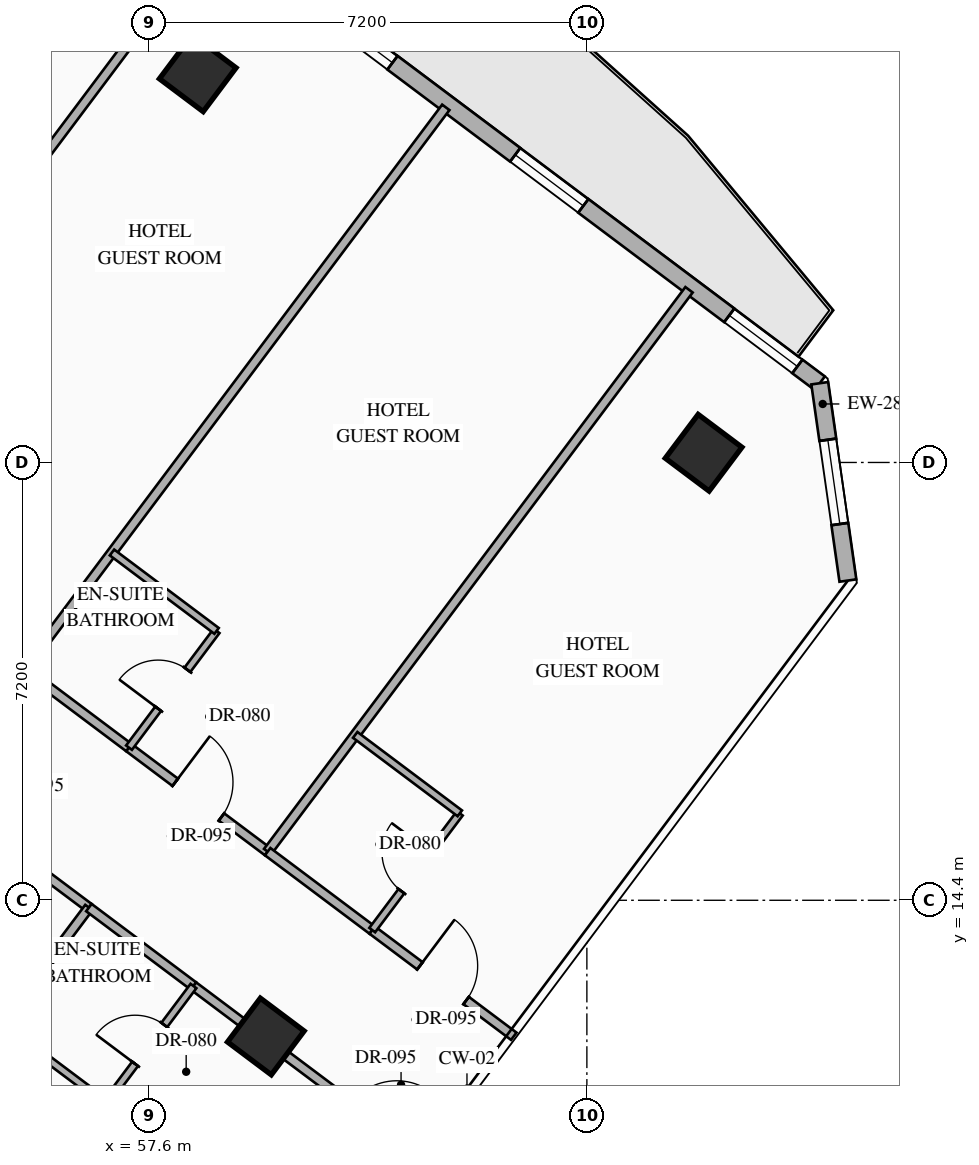
"""IFC4 building model, lengths in metres.
Left out: names, types, materials, properties, quantities, classifications, styles, units other than length and angle.
Written with IfcOpenShell. Run it as: python <this file> out.ifc"""

import sys

from ifc_helpers import new_model, si_unit, direction, frame, frame_2d, origin, origin_2d, place, context, subcontext, project, spatial, rectangle, hollow_rectangle, extrude, element, fill, save


model = new_model("IFC4")
c1 = context("Model", 3, precision=1e-05, world=origin(), true_north=direction((0.0, 1.0)))
c2 = subcontext(c1, "Body", "Model", "MODEL_VIEW")
j1 = project(units=[si_unit("LENGTHUNIT", "METRE"), si_unit("PLANEANGLEUNIT", "RADIAN")], contexts=[c1])
p1 = place(None, origin())
s1 = spatial("IfcSite", under=j1, at=p1, CompositionType="ELEMENT")
p2 = place(p1, origin())
s2 = spatial("IfcBuilding", under=s1, at=p2, CompositionType="ELEMENT")
p3 = place(p2, frame((0.0, 0.0, 74.6)))
s3 = spatial("IfcBuildingStorey", under=s2, at=p3, CompositionType="ELEMENT", Elevation=74.6)
for number, where, z_axis, x_axis in (
    (1, (58.4, 28.0, 0.0), (0.0, 0.0, 1.0), (0.8, -0.6, 0.0)),
    (2, (66.72, 21.76, 0.0), (0.0, 0.0, 1.0), (0.8, -0.6, 0.0)),
    (3, (59.52, 12.16, 0.0), (0.0, 0.0, 1.0), (0.8, -0.6, 0.0)),
):
    element("IfcColumn", number, at=place(p3, frame(where, z_axis=z_axis, x_axis=x_axis)), inside=s3, PredefinedType="COLUMN", context=c2, shape_type="SweptSolid", body=[
        extrude(hollow_rectangle(XDim=0.9, YDim=0.9, WallThickness=0.036, at=origin_2d()), origin(), (0.0, 0.0, 1.0), 3.35),
    ])
p4 = place(p3, frame((44.86, 40.73, 0.0), z_axis=(0.0, 0.0, 1.0), x_axis=(0.800006902154, -0.599990797017, 0.0)))
e4 = element("IfcWall", 4, at=p4, inside=s3, PredefinedType="STANDARD", context=c2, shape_type="SweptSolid", body=[
    extrude(rectangle(XDim=29.712, YDim=0.28, at=frame_2d((14.856, 0.0))), origin(), (0.0, 0.0, 1.0), 3.13),
])
p5 = place(p4, frame((14.249, 0.0, 0.0)))
e5 = element("IfcOpeningElement", 5, at=p5, cuts=e4, PredefinedType="OPENING", context=c2, shape_type="SweptSolid", body=[
    extrude(rectangle(XDim=1.1, YDim=2.2, at=frame_2d((0.55, 1.1))), frame((0.0, 0.15, 0.0), z_axis=(0.0, -1.0, 0.0), x_axis=(1.0, 0.0, 0.0)), (0.0, 0.0, 1.0), 0.3),
])
p6 = place(p4, frame((1.612, 0.0, 0.85)))
e6 = element("IfcOpeningElement", 6, at=p6, cuts=e4, PredefinedType="OPENING", context=c2, shape_type="SweptSolid", body=[
    extrude(rectangle(XDim=1.4, YDim=1.8, at=frame_2d((0.7, 0.9))), frame((0.0, 0.15, 0.0), z_axis=(0.0, -1.0, 0.0), x_axis=(1.0, 0.0, 0.0)), (0.0, 0.0, 1.0), 0.3),
])
p7 = place(p4, frame((5.667, 0.0, 0.85)))
e7 = element("IfcOpeningElement", 7, at=p7, cuts=e4, PredefinedType="OPENING", context=c2, shape_type="SweptSolid", body=[
    extrude(rectangle(XDim=1.4, YDim=1.8, at=frame_2d((0.7, 0.9))), frame((0.0, 0.15, 0.0), z_axis=(0.0, -1.0, 0.0), x_axis=(1.0, 0.0, 0.0)), (0.0, 0.0, 1.0), 0.3),
])
p8 = place(p4, frame((9.912, 0.0, 0.85)))
e8 = element("IfcOpeningElement", 8, at=p8, cuts=e4, PredefinedType="OPENING", context=c2, shape_type="SweptSolid", body=[
    extrude(rectangle(XDim=1.4, YDim=1.8, at=frame_2d((0.7, 0.9))), frame((0.0, 0.15, 0.0), z_axis=(0.0, -1.0, 0.0), x_axis=(1.0, 0.0, 0.0)), (0.0, 0.0, 1.0), 0.3),
])
p9 = place(p4, frame((19.528, 0.0, 0.85)))
e9 = element("IfcOpeningElement", 9, at=p9, cuts=e4, PredefinedType="OPENING", context=c2, shape_type="SweptSolid", body=[
    extrude(rectangle(XDim=1.4, YDim=1.8, at=frame_2d((0.7, 0.9))), frame((0.0, 0.15, 0.0), z_axis=(0.0, -1.0, 0.0), x_axis=(1.0, 0.0, 0.0)), (0.0, 0.0, 1.0), 0.3),
])
p10 = place(p4, frame((23.451, 0.0, 0.85)))
e10 = element("IfcOpeningElement", 10, at=p10, cuts=e4, PredefinedType="OPENING", context=c2, shape_type="SweptSolid", body=[
    extrude(rectangle(XDim=1.4, YDim=1.8, at=frame_2d((0.7, 0.9))), frame((0.0, 0.15, 0.0), z_axis=(0.0, -1.0, 0.0), x_axis=(1.0, 0.0, 0.0)), (0.0, 0.0, 1.0), 0.3),
])
p11 = place(p4, frame((27.852, 0.0, 0.85)))
e11 = element("IfcOpeningElement", 11, at=p11, cuts=e4, PredefinedType="OPENING", context=c2, shape_type="SweptSolid", body=[
    extrude(rectangle(XDim=1.4, YDim=1.8, at=frame_2d((0.7, 0.9))), frame((0.0, 0.15, 0.0), z_axis=(0.0, -1.0, 0.0), x_axis=(1.0, 0.0, 0.0)), (0.0, 0.0, 1.0), 0.3),
])
p12 = place(p3, frame((68.63, 22.903, 0.0), z_axis=(0.0, 0.0, 1.0), x_axis=(0.141285803956, -0.989968848803, 0.0)))
e12 = element("IfcWall", 12, at=p12, inside=s3, PredefinedType="STANDARD", context=c2, shape_type="SweptSolid", body=[
    extrude(rectangle(XDim=3.278, YDim=0.28, at=frame_2d((1.639, 0.0))), origin(), (0.0, 0.0, 1.0), 3.13),
])
p13 = place(p12, frame((0.939, 0.0, 0.85)))
e13 = element("IfcOpeningElement", 13, at=p13, cuts=e12, PredefinedType="OPENING", context=c2, shape_type="SweptSolid", body=[
    extrude(rectangle(XDim=1.4, YDim=1.8, at=frame_2d((0.7, 0.9))), frame((0.0, 0.15, 0.0), z_axis=(0.0, -1.0, 0.0), x_axis=(1.0, 0.0, 0.0)), (0.0, 0.0, 1.0), 0.3),
])
for number, where, z_axis, x_axis in (
    (14, (51.71, 21.08, 0.0), (0.0, 0.0, 1.0), (0.6, 0.8, 0.0)),
    (15, (55.55, 18.2, 0.0), (0.0, 0.0, 1.0), (0.6, 0.8, 0.0)),
):
    element("IfcWall", number, at=place(p3, frame(where, z_axis=z_axis, x_axis=x_axis)), inside=s3, PredefinedType="PARTITIONING", context=c2, shape_type="SweptSolid", body=[
        extrude(rectangle(XDim=11.55, YDim=0.15, at=frame_2d((5.775, 0.0))), origin(), (0.0, 0.0, 1.0), 3.13),
    ])
p14 = place(p3, frame((55.55, 18.2, 0.0), z_axis=(0.0, 0.0, 1.0), x_axis=(0.79998637334, -0.60001816845, 0.0)))
e16 = element("IfcWall", 16, at=p14, inside=s3, PredefinedType="PARTITIONING", context=c2, shape_type="SweptSolid", body=[
    extrude(rectangle(XDim=2.15, YDim=0.15, at=frame_2d((1.075, 0.0))), origin(), (0.0, 0.0, 1.0), 2.775),
])
p15 = place(p3, frame((57.27, 16.91, 0.0), z_axis=(0.0, 0.0, 1.0), x_axis=(0.800010279488, -0.599986293772, 0.0)))
e17 = element("IfcWall", 17, at=p15, inside=s3, PredefinedType="PARTITIONING", context=c2, shape_type="SweptSolid", body=[
    extrude(rectangle(XDim=2.85, YDim=0.15, at=frame_2d((1.425, 0.0))), origin(), (0.0, 0.0, 1.0), 2.775),
])
p16 = place(p15, frame((0.95, 0.0, 0.0)))
e18 = element("IfcOpeningElement", 18, at=p16, cuts=e17, PredefinedType="OPENING", context=c2, shape_type="SweptSolid", body=[
    extrude(rectangle(XDim=0.95, YDim=2.15, at=frame_2d((0.475, 1.075))), frame((0.0, 0.085, 0.0), z_axis=(0.0, -1.0, 0.0), x_axis=(1.0, 0.0, 0.0)), (0.0, 0.0, 1.0), 0.17),
])
p17 = place(p3, frame((57.27, 16.91, 0.0), z_axis=(0.0, 0.0, 1.0), x_axis=(0.599951172744, 0.800036618114, 0.0)))
e19 = element("IfcWall", 19, at=p17, inside=s3, PredefinedType="PARTITIONING", context=c2, shape_type="SweptSolid", body=[
    extrude(rectangle(XDim=2.4, YDim=0.12, at=frame_2d((1.2, 0.0))), origin(), (0.0, 0.0, 1.0), 3.13),
])
p18 = place(p17, frame((0.8, 0.0, 0.0)))
e20 = element("IfcOpeningElement", 20, at=p18, cuts=e19, PredefinedType="OPENING", context=c2, shape_type="SweptSolid", body=[
    extrude(rectangle(XDim=0.8, YDim=2.06, at=frame_2d((0.4, 1.03))), frame((0.0, 0.07, 0.0), z_axis=(0.0, -1.0, 0.0), x_axis=(1.0, 0.0, 0.0)), (0.0, 0.0, 1.0), 0.14),
])
p19 = place(p3, frame((56.99, 20.12, 0.0), z_axis=(0.0, 0.0, 1.0), x_axis=(0.79998637334, -0.60001816845, 0.0)))
e21 = element("IfcWall", 21, at=p19, inside=s3, PredefinedType="PARTITIONING", context=c2, shape_type="SweptSolid", body=[
    extrude(rectangle(XDim=2.15, YDim=0.12, at=frame_2d((1.075, 0.0))), origin(), (0.0, 0.0, 1.0), 3.13),
])
p20 = place(p3, frame((59.55, 15.2, 0.0), z_axis=(0.0, 0.0, 1.0), x_axis=(0.599996617946, 0.80000253653, 0.0)))
e22 = element("IfcWall", 22, at=p20, inside=s3, PredefinedType="PARTITIONING", context=c2, shape_type="SweptSolid", body=[
    extrude(rectangle(XDim=11.55, YDim=0.15, at=frame_2d((5.775, 0.0))), origin(), (0.0, 0.0, 1.0), 3.13),
])
p21 = place(p3, frame((59.55, 15.2, 0.0), z_axis=(0.0, 0.0, 1.0), x_axis=(0.79998637334, -0.60001816845, 0.0)))
e23 = element("IfcWall", 23, at=p21, inside=s3, PredefinedType="PARTITIONING", context=c2, shape_type="SweptSolid", body=[
    extrude(rectangle(XDim=2.15, YDim=0.15, at=frame_2d((1.075, 0.0))), origin(), (0.0, 0.0, 1.0), 2.775),
])
p22 = place(p3, frame((61.27, 13.91, 0.0), z_axis=(0.0, 0.0, 1.0), x_axis=(0.800010068184, -0.59998657552, 0.0)))
e24 = element("IfcWall", 24, at=p22, inside=s3, PredefinedType="PARTITIONING", context=c2, shape_type="SweptSolid", body=[
    extrude(rectangle(XDim=2.91, YDim=0.15, at=frame_2d((1.455, 0.0))), origin(), (0.0, 0.0, 1.0), 3.13),
])
p23 = place(p22, frame((0.98, 0.0, 0.0)))
e25 = element("IfcOpeningElement", 25, at=p23, cuts=e24, PredefinedType="OPENING", context=c2, shape_type="SweptSolid", body=[
    extrude(rectangle(XDim=0.95, YDim=2.15, at=frame_2d((0.475, 1.075))), frame((0.0, 0.085, 0.0), z_axis=(0.0, -1.0, 0.0), x_axis=(1.0, 0.0, 0.0)), (0.0, 0.0, 1.0), 0.17),
])
p24 = place(p3, frame((61.27, 13.91, 0.0), z_axis=(0.0, 0.0, 1.0), x_axis=(0.599951172744, 0.800036618114, 0.0)))
e26 = element("IfcWall", 26, at=p24, inside=s3, PredefinedType="PARTITIONING", context=c2, shape_type="SweptSolid", body=[
    extrude(rectangle(XDim=2.4, YDim=0.12, at=frame_2d((1.2, 0.0))), origin(), (0.0, 0.0, 1.0), 3.13),
])
p25 = place(p24, frame((0.8, 0.0, 0.0)))
e27 = element("IfcOpeningElement", 27, at=p25, cuts=e26, PredefinedType="OPENING", context=c2, shape_type="SweptSolid", body=[
    extrude(rectangle(XDim=0.8, YDim=2.06, at=frame_2d((0.4, 1.03))), frame((0.0, 0.07, 0.0), z_axis=(0.0, -1.0, 0.0), x_axis=(1.0, 0.0, 0.0)), (0.0, 0.0, 1.0), 0.14),
])
p26 = place(p3, frame((60.99, 17.12, 0.0), z_axis=(0.0, 0.0, 1.0), x_axis=(0.79998637334, -0.60001816845, 0.0)))
e28 = element("IfcWall", 28, at=p26, inside=s3, PredefinedType="PARTITIONING", context=c2, shape_type="SweptSolid", body=[
    extrude(rectangle(XDim=2.15, YDim=0.12, at=frame_2d((1.075, 0.0))), origin(), (0.0, 0.0, 1.0), 3.13),
])
p27 = place(p3, frame((52.89, 17.07, 0.0), z_axis=(0.0, 0.0, 1.0), x_axis=(0.800012600101, -0.599983199498, 0.0)))
e29 = element("IfcWall", 29, at=p27, inside=s3, PredefinedType="PARTITIONING", context=c2, shape_type="SweptSolid", body=[
    extrude(rectangle(XDim=4.65, YDim=0.15, at=frame_2d((2.325, 0.0))), origin(), (0.0, 0.0, 1.0), 2.425),
])
p28 = place(p27, frame((1.85, 0.0, 0.0)))
e30 = element("IfcOpeningElement", 30, at=p28, cuts=e29, PredefinedType="OPENING", context=c2, shape_type="SweptSolid", body=[
    extrude(rectangle(XDim=0.95, YDim=2.15, at=frame_2d((0.475, 1.075))), frame((0.0, 0.085, 0.0), z_axis=(0.0, -1.0, 0.0), x_axis=(1.0, 0.0, 0.0)), (0.0, 0.0, 1.0), 0.17),
])
p29 = place(p3, frame((49.8, 5.2, 0.0), z_axis=(0.0, 0.0, 1.0), x_axis=(0.6, 0.8, 0.0)))
e31 = element("IfcWall", 31, at=p29, inside=s3, PredefinedType="PARTITIONING", context=c2, shape_type="SweptSolid", body=[
    extrude(rectangle(XDim=11.35, YDim=0.15, at=frame_2d((5.675, 0.0))), origin(), (0.0, 0.0, 1.0), 3.13),
])
p30 = place(p3, frame((56.61, 14.28, 0.0), z_axis=(0.0, 0.0, 1.0), x_axis=(0.79998637334, -0.60001816845, 0.0)))
e32 = element("IfcWall", 32, at=p30, inside=s3, PredefinedType="PARTITIONING", context=c2, shape_type="SweptSolid", body=[
    extrude(rectangle(XDim=2.15, YDim=0.15, at=frame_2d((1.075, 0.0))), origin(), (0.0, 0.0, 1.0), 2.425),
])
p31 = place(p3, frame((58.33, 12.99, 0.0), z_axis=(0.0, 0.0, 1.0), x_axis=(0.799993779569, -0.600008293819, 0.0)))
e33 = element("IfcWall", 33, at=p31, inside=s3, PredefinedType="PARTITIONING", context=c2, shape_type="SweptSolid", body=[
    extrude(rectangle(XDim=4.71, YDim=0.15, at=frame_2d((2.355, 0.0))), origin(), (0.0, 0.0, 1.0), 2.425),
])
p32 = place(p31, frame((3.23, 0.0, 0.0)))
e34 = element("IfcOpeningElement", 34, at=p32, cuts=e33, PredefinedType="OPENING", context=c2, shape_type="SweptSolid", body=[
    extrude(rectangle(XDim=0.95, YDim=2.15, at=frame_2d((0.475, 1.075))), frame((0.0, 0.085, 0.0), z_axis=(0.0, -1.0, 0.0), x_axis=(1.0, 0.0, 0.0)), (0.0, 0.0, 1.0), 0.17),
])
p33 = place(p3, frame((56.89, 11.07, 0.0), z_axis=(0.0, 0.0, 1.0), x_axis=(0.600065100855, 0.79995117022, 0.0)))
e35 = element("IfcWall", 35, at=p33, inside=s3, PredefinedType="PARTITIONING", context=c2, shape_type="SweptSolid", body=[
    extrude(rectangle(XDim=2.4, YDim=0.12, at=frame_2d((1.2, 0.0))), origin(), (0.0, 0.0, 1.0), 3.13),
])
p34 = place(p33, frame((0.8, 0.0, 0.0)))
e36 = element("IfcOpeningElement", 36, at=p34, cuts=e35, PredefinedType="OPENING", context=c2, shape_type="SweptSolid", body=[
    extrude(rectangle(XDim=0.8, YDim=2.06, at=frame_2d((0.4, 1.03))), frame((0.0, 0.07, 0.0), z_axis=(0.0, -1.0, 0.0), x_axis=(1.0, 0.0, 0.0)), (0.0, 0.0, 1.0), 0.14),
])
p35 = place(p3, frame((55.17, 12.36, 0.0), z_axis=(0.0, 0.0, 1.0), x_axis=(0.79998637334, -0.60001816845, 0.0)))
e37 = element("IfcWall", 37, at=p35, inside=s3, PredefinedType="PARTITIONING", context=c2, shape_type="SweptSolid", body=[
    extrude(rectangle(XDim=2.15, YDim=0.12, at=frame_2d((1.075, 0.0))), origin(), (0.0, 0.0, 1.0), 3.13),
])
p36 = place(p9, origin())
e38 = element("IfcWindow", 38, at=p36, inside=s3, PartitioningType="SINGLE_PANEL", PredefinedType="WINDOW", context=c2, shape_type="SweptSolid", body=[
    extrude(rectangle(XDim=1.4, YDim=1.8, at=frame_2d((0.7, 0.9))), frame((0.0, 0.03, 0.0), z_axis=(0.0, -1.0, 0.0), x_axis=(1.0, 0.0, 0.0)), (0.0, 0.0, 1.0), 0.06),
])
fill(e9, e38)
p37 = place(p10, origin())
e39 = element("IfcWindow", 39, at=p37, inside=s3, PartitioningType="SINGLE_PANEL", PredefinedType="WINDOW", context=c2, shape_type="SweptSolid", body=[
    extrude(rectangle(XDim=1.4, YDim=1.8, at=frame_2d((0.7, 0.9))), frame((0.0, 0.03, 0.0), z_axis=(0.0, -1.0, 0.0), x_axis=(1.0, 0.0, 0.0)), (0.0, 0.0, 1.0), 0.06),
])
fill(e10, e39)
p38 = place(p11, origin())
e40 = element("IfcWindow", 40, at=p38, inside=s3, PartitioningType="SINGLE_PANEL", PredefinedType="WINDOW", context=c2, shape_type="SweptSolid", body=[
    extrude(rectangle(XDim=1.4, YDim=1.8, at=frame_2d((0.7, 0.9))), frame((0.0, 0.03, 0.0), z_axis=(0.0, -1.0, 0.0), x_axis=(1.0, 0.0, 0.0)), (0.0, 0.0, 1.0), 0.06),
])
fill(e11, e40)
p39 = place(p13, origin())
e41 = element("IfcWindow", 41, at=p39, inside=s3, PartitioningType="SINGLE_PANEL", PredefinedType="WINDOW", context=c2, shape_type="SweptSolid", body=[
    extrude(rectangle(XDim=1.4, YDim=1.8, at=frame_2d((0.7, 0.9))), frame((0.0, 0.03, 0.0), z_axis=(0.0, -1.0, 0.0), x_axis=(1.0, 0.0, 0.0)), (0.0, 0.0, 1.0), 0.06),
])
fill(e13, e41)
p40 = place(p16, origin())
e42 = element("IfcDoor", 42, at=p40, inside=s3, OperationType="SINGLE_SWING_LEFT", PredefinedType="DOOR", context=c2, shape_type="SweptSolid", body=[
    extrude(rectangle(XDim=0.95, YDim=2.15, at=frame_2d((0.475, 1.075))), frame((0.0, 0.025, 0.0), z_axis=(0.0, -1.0, 0.0), x_axis=(1.0, 0.0, 0.0)), (0.0, 0.0, 1.0), 0.05),
])
fill(e18, e42)
p41 = place(p18, origin())
e43 = element("IfcDoor", 43, at=p41, inside=s3, OperationType="SINGLE_SWING_LEFT", PredefinedType="DOOR", context=c2, shape_type="SweptSolid", body=[
    extrude(rectangle(XDim=0.8, YDim=2.06, at=frame_2d((0.4, 1.03))), frame((0.0, 0.025, 0.0), z_axis=(0.0, -1.0, 0.0), x_axis=(1.0, 0.0, 0.0)), (0.0, 0.0, 1.0), 0.05),
])
fill(e20, e43)
p42 = place(p23, origin())
e44 = element("IfcDoor", 44, at=p42, inside=s3, OperationType="SINGLE_SWING_LEFT", PredefinedType="DOOR", context=c2, shape_type="SweptSolid", body=[
    extrude(rectangle(XDim=0.95, YDim=2.15, at=frame_2d((0.475, 1.075))), frame((0.0, 0.025, 0.0), z_axis=(0.0, -1.0, 0.0), x_axis=(1.0, 0.0, 0.0)), (0.0, 0.0, 1.0), 0.05),
])
fill(e25, e44)
p43 = place(p25, origin())
e45 = element("IfcDoor", 45, at=p43, inside=s3, OperationType="SINGLE_SWING_RIGHT", PredefinedType="DOOR", context=c2, shape_type="SweptSolid", body=[
    extrude(rectangle(XDim=0.8, YDim=2.06, at=frame_2d((0.4, 1.03))), frame((0.0, 0.025, 0.0), z_axis=(0.0, -1.0, 0.0), x_axis=(1.0, 0.0, 0.0)), (0.0, 0.0, 1.0), 0.05),
])
fill(e27, e45)
p44 = place(p34, origin())
e46 = element("IfcDoor", 46, at=p44, inside=s3, OperationType="SINGLE_SWING_LEFT", PredefinedType="DOOR", context=c2, shape_type="SweptSolid", body=[
    extrude(rectangle(XDim=0.8, YDim=2.06, at=frame_2d((0.4, 1.03))), frame((0.0, 0.025, 0.0), z_axis=(0.0, -1.0, 0.0), x_axis=(1.0, 0.0, 0.0)), (0.0, 0.0, 1.0), 0.05),
])
fill(e36, e46)
save(model, sys.argv[1])
